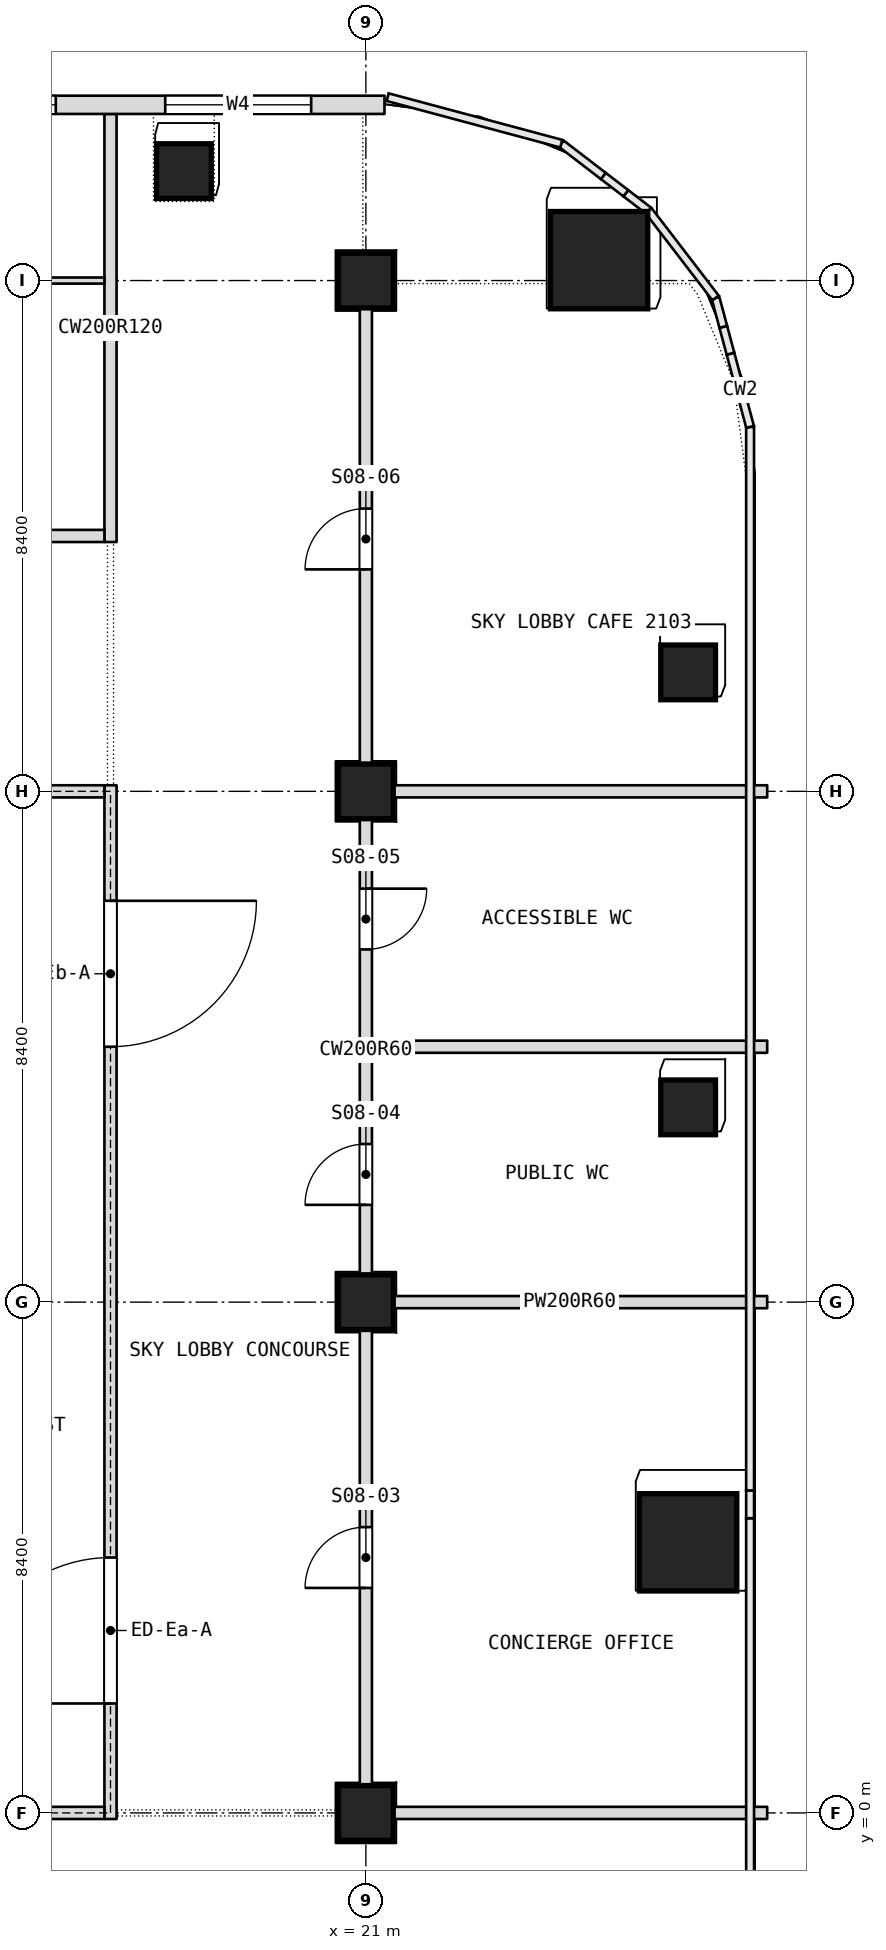
"""IFC4 building model, lengths in metres.
Left out: names, types, materials, properties, quantities, classifications, styles, units other than length and angle.
Written with IfcOpenShell. Run it as: python <this file> out.ifc"""

import sys

from ifc_helpers import new_model, si_unit, direction, frame, frame_2d, origin, origin_2d, place, context, subcontext, project, spatial, rectangle, extrude, element, fill, save


model = new_model("IFC4")
c1 = context("Model", 3, precision=1e-05, world=origin(), true_north=direction((0.0, 1.0)))
c2 = subcontext(c1, "Body", "Model", "MODEL_VIEW")
j1 = project(units=[si_unit("LENGTHUNIT", "METRE"), si_unit("PLANEANGLEUNIT", "RADIAN")], contexts=[c1])
p1 = place(None, origin())
s1 = spatial("IfcSite", under=j1, at=p1, CompositionType="ELEMENT")
p2 = place(p1, origin())
s2 = spatial("IfcBuilding", under=s1, at=p2, CompositionType="ELEMENT")
p3 = place(p2, frame((0.0, 0.0, 97.7)))
s3 = spatial("IfcBuildingStorey", under=s2, at=p3, CompositionType="ELEMENT", Elevation=97.7)
for number, where, z_axis, x_axis in (
    (1, (26.3, 4.45, 0.0), (0.0, 0.0, 1.0), (1.0, 0.0, 0.0)),
    (2, (24.835, 25.535, 0.0), (0.0, 0.0, 1.0), (1.0, 0.0, 0.0)),
):
    element("IfcColumn", number, at=place(p3, frame(where, z_axis=z_axis, x_axis=x_axis)), inside=s3, PredefinedType="COLUMN", context=c2, shape_type="SweptSolid", body=[
        extrude(rectangle(XDim=1.6, YDim=1.6, at=origin_2d()), origin(), (0.0, 0.0, 1.0), 7.2),
    ])
for number, where, z_axis, x_axis in (
    (3, (21.0, 0.0, 0.0), (0.0, 0.0, 1.0), (1.0, 0.0, 0.0)),
    (4, (21.0, 8.4, 0.0), (0.0, 0.0, 1.0), (1.0, 0.0, 0.0)),
    (5, (21.0, 16.8, 0.0), (0.0, 0.0, 1.0), (1.0, 0.0, 0.0)),
    (6, (21.0, 25.2, 0.0), (0.0, 0.0, 1.0), (1.0, 0.0, 0.0)),
    (7, (18.007, 27.0, 0.0), (0.0, 0.0, 1.0), (1.0, 0.0, 0.0)),
    (8, (26.3, 18.756, 0.0), (0.0, 0.0, 1.0), (1.0, 0.0, 0.0)),
    (9, (26.3, 11.603, 0.0), (0.0, 0.0, 1.0), (1.0, 0.0, 0.0)),
):
    element("IfcColumn", number, at=place(p3, frame(where, z_axis=z_axis, x_axis=x_axis)), inside=s3, PredefinedType="COLUMN", context=c2, shape_type="SweptSolid", body=[
        extrude(rectangle(XDim=0.9, YDim=0.9, at=origin_2d()), origin(), (0.0, 0.0, 1.0), 7.2),
    ])
p4 = place(p3, frame((21.0, -0.1, 0.0), z_axis=(0.0, 0.0, 1.0), x_axis=(0.0, 1.0, 0.0)))
e10 = element("IfcWall", 10, at=p4, inside=s3, PredefinedType="PARTITIONING", context=c2, shape_type="SweptSolid", body=[
    extrude(rectangle(XDim=25.3, YDim=0.2, at=frame_2d((12.65, 0.0))), origin(), (0.0, 0.0, 1.0), 6.94),
])
p5 = place(p4, frame((3.8, 0.0, 0.0)))
e11 = element("IfcOpeningElement", 11, at=p5, cuts=e10, PredefinedType="OPENING", context=c2, shape_type="SweptSolid", body=[
    extrude(rectangle(XDim=1.0, YDim=2.1, at=frame_2d((0.5, 1.05))), frame((0.0, 0.1, 0.0), z_axis=(0.0, -1.0, 0.0), x_axis=(1.0, 0.0, 0.0)), (0.0, 0.0, 1.0), 0.2),
])
p6 = place(p4, frame((10.1, 0.0, 0.0)))
e12 = element("IfcOpeningElement", 12, at=p6, cuts=e10, PredefinedType="OPENING", context=c2, shape_type="SweptSolid", body=[
    extrude(rectangle(XDim=1.0, YDim=2.1, at=frame_2d((0.5, 1.05))), frame((0.0, 0.1, 0.0), z_axis=(0.0, -1.0, 0.0), x_axis=(1.0, 0.0, 0.0)), (0.0, 0.0, 1.0), 0.2),
])
p7 = place(p4, frame((14.3, 0.0, 0.0)))
e13 = element("IfcOpeningElement", 13, at=p7, cuts=e10, PredefinedType="OPENING", context=c2, shape_type="SweptSolid", body=[
    extrude(rectangle(XDim=1.0, YDim=2.1, at=frame_2d((0.5, 1.05))), frame((0.0, 0.1, 0.0), z_axis=(0.0, -1.0, 0.0), x_axis=(1.0, 0.0, 0.0)), (0.0, 0.0, 1.0), 0.2),
])
p8 = place(p4, frame((20.55, 0.0, 0.0)))
e14 = element("IfcOpeningElement", 14, at=p8, cuts=e10, PredefinedType="OPENING", context=c2, shape_type="SweptSolid", body=[
    extrude(rectangle(XDim=1.0, YDim=2.1, at=frame_2d((0.5, 1.05))), frame((0.0, 0.1, 0.0), z_axis=(0.0, -1.0, 0.0), x_axis=(1.0, 0.0, 0.0)), (0.0, 0.0, 1.0), 0.2),
])
p9 = place(p3, frame((16.8, 20.9, 0.0), z_axis=(0.0, 0.0, 1.0), x_axis=(0.0, 1.0, 0.0)))
e15 = element("IfcWall", 15, at=p9, inside=s3, PredefinedType="PARTITIONING", context=c2, shape_type="SweptSolid", body=[
    extrude(rectangle(XDim=7.04, YDim=0.2, at=frame_2d((3.52, 0.0))), origin(), (0.0, 0.0, 1.0), 6.94),
])
for number, where, z_axis, x_axis in (
    (16, (21.1, 0.0, 0.0), (0.0, 0.0, 1.0), (1.0, 0.0, 0.0)),
    (17, (21.1, 8.4, 0.0), (0.0, 0.0, 1.0), (1.0, 0.0, 0.0)),
):
    element("IfcWall", number, at=place(p3, frame(where, z_axis=z_axis, x_axis=x_axis)), inside=s3, PredefinedType="PARTITIONING", context=c2, shape_type="SweptSolid", body=[
        extrude(rectangle(XDim=6.5, YDim=0.2, at=frame_2d((3.25, 0.0))), origin(), (0.0, 0.0, 1.0), 6.49),
    ])
p10 = place(p3, frame((21.1, 12.6, 0.0), z_axis=(0.0, 0.0, 1.0), x_axis=(1.0, 0.0, 0.0)))
e18 = element("IfcWall", 18, at=p10, inside=s3, PredefinedType="PARTITIONING", context=c2, shape_type="SweptSolid", body=[
    extrude(rectangle(XDim=6.5, YDim=0.2, at=frame_2d((3.25, 0.0))), origin(), (0.0, 0.0, 1.0), 6.94),
])
p11 = place(p3, frame((21.1, 16.8, 0.0), z_axis=(0.0, 0.0, 1.0), x_axis=(1.0, 0.0, 0.0)))
e19 = element("IfcWall", 19, at=p11, inside=s3, PredefinedType="PARTITIONING", context=c2, shape_type="SweptSolid", body=[
    extrude(rectangle(XDim=6.5, YDim=0.2, at=frame_2d((3.25, 0.0))), origin(), (0.0, 0.0, 1.0), 6.49),
])
p12 = place(p3, frame((9.1, 21.0, 0.0), z_axis=(0.0, 0.0, 1.0), x_axis=(1.0, 0.0, 0.0)))
e20 = element("IfcWall", 20, at=p12, inside=s3, PredefinedType="PARTITIONING", context=c2, shape_type="SweptSolid", body=[
    extrude(rectangle(XDim=7.6, YDim=0.2, at=frame_2d((3.8, 0.0))), origin(), (0.0, 0.0, 1.0), 6.94),
])
p13 = place(p12, frame((3.3, 0.0, 0.0)))
e21 = element("IfcOpeningElement", 21, at=p13, cuts=e20, PredefinedType="OPENING", context=c2, shape_type="SweptSolid", body=[
    extrude(rectangle(XDim=1.0, YDim=2.1, at=frame_2d((0.5, 1.05))), frame((0.0, 0.1, 0.0), z_axis=(0.0, -1.0, 0.0), x_axis=(1.0, 0.0, 0.0)), (0.0, 0.0, 1.0), 0.2),
])
p14 = place(p3, frame((-4.1, 25.2, 0.0), z_axis=(0.0, 0.0, 1.0), x_axis=(1.0, 0.0, 0.0)))
e22 = element("IfcWall", 22, at=p14, inside=s3, PredefinedType="PARTITIONING", context=c2, shape_type="SweptSolid", body=[
    extrude(rectangle(XDim=20.8, YDim=0.1, at=frame_2d((10.4, 0.0))), origin(), (0.0, 0.0, 1.0), 6.49),
])
p15 = place(p14, frame((9.9, 0.0, 0.0)))
e23 = element("IfcOpeningElement", 23, at=p15, cuts=e22, PredefinedType="OPENING", context=c2, shape_type="SweptSolid", body=[
    extrude(rectangle(XDim=1.0, YDim=2.1, at=frame_2d((0.5, 1.05))), frame((0.0, 0.05, 0.0), z_axis=(0.0, -1.0, 0.0), x_axis=(1.0, 0.0, 0.0)), (0.0, 0.0, 1.0), 0.1),
])
p16 = place(p3, frame((21.306, 28.09, 0.0), z_axis=(0.0, 0.0, 1.0), x_axis=(-1.0, 0.0, 0.0)))
e24 = element("IfcWall", 24, at=p16, inside=s3, PredefinedType="NOTDEFINED", context=c2, shape_type="SweptSolid", body=[
    extrude(rectangle(XDim=42.612, YDim=0.3, at=frame_2d((21.306, 0.0))), origin(), (0.0, 0.0, 1.0), 7.2),
])
p17 = place(p16, frame((1.206, 0.0, 0.9)))
e25 = element("IfcOpeningElement", 25, at=p17, cuts=e24, PredefinedType="OPENING", context=c2, shape_type="SweptSolid", body=[
    extrude(rectangle(XDim=2.4, YDim=4.5, at=frame_2d((1.2, 2.25))), frame((0.0, 0.15, 0.0), z_axis=(0.0, -1.0, 0.0), x_axis=(1.0, 0.0, 0.0)), (0.0, 0.0, 1.0), 0.3),
])
p18 = place(p16, frame((5.406, 0.0, 0.9)))
e26 = element("IfcOpeningElement", 26, at=p18, cuts=e24, PredefinedType="OPENING", context=c2, shape_type="SweptSolid", body=[
    extrude(rectangle(XDim=2.4, YDim=4.5, at=frame_2d((1.2, 2.25))), frame((0.0, 0.15, 0.0), z_axis=(0.0, -1.0, 0.0), x_axis=(1.0, 0.0, 0.0)), (0.0, 0.0, 1.0), 0.3),
])
p19 = place(p16, frame((9.606, 0.0, 0.9)))
e27 = element("IfcOpeningElement", 27, at=p19, cuts=e24, PredefinedType="OPENING", context=c2, shape_type="SweptSolid", body=[
    extrude(rectangle(XDim=2.4, YDim=4.5, at=frame_2d((1.2, 2.25))), frame((0.0, 0.15, 0.0), z_axis=(0.0, -1.0, 0.0), x_axis=(1.0, 0.0, 0.0)), (0.0, 0.0, 1.0), 0.3),
])
p20 = place(p16, frame((13.806, 0.0, 0.9)))
e28 = element("IfcOpeningElement", 28, at=p20, cuts=e24, PredefinedType="OPENING", context=c2, shape_type="SweptSolid", body=[
    extrude(rectangle(XDim=2.4, YDim=4.5, at=frame_2d((1.2, 2.25))), frame((0.0, 0.15, 0.0), z_axis=(0.0, -1.0, 0.0), x_axis=(1.0, 0.0, 0.0)), (0.0, 0.0, 1.0), 0.3),
])
p21 = place(p16, frame((18.006, 0.0, 0.9)))
e29 = element("IfcOpeningElement", 29, at=p21, cuts=e24, PredefinedType="OPENING", context=c2, shape_type="SweptSolid", body=[
    extrude(rectangle(XDim=2.4, YDim=4.5, at=frame_2d((1.2, 2.25))), frame((0.0, 0.15, 0.0), z_axis=(0.0, -1.0, 0.0), x_axis=(1.0, 0.0, 0.0)), (0.0, 0.0, 1.0), 0.3),
])
p22 = place(p16, frame((22.206, 0.0, 0.9)))
e30 = element("IfcOpeningElement", 30, at=p22, cuts=e24, PredefinedType="OPENING", context=c2, shape_type="SweptSolid", body=[
    extrude(rectangle(XDim=2.4, YDim=4.5, at=frame_2d((1.2, 2.25))), frame((0.0, 0.15, 0.0), z_axis=(0.0, -1.0, 0.0), x_axis=(1.0, 0.0, 0.0)), (0.0, 0.0, 1.0), 0.3),
])
p23 = place(p16, frame((26.406, 0.0, 0.9)))
e31 = element("IfcOpeningElement", 31, at=p23, cuts=e24, PredefinedType="OPENING", context=c2, shape_type="SweptSolid", body=[
    extrude(rectangle(XDim=2.4, YDim=4.5, at=frame_2d((1.2, 2.25))), frame((0.0, 0.15, 0.0), z_axis=(0.0, -1.0, 0.0), x_axis=(1.0, 0.0, 0.0)), (0.0, 0.0, 1.0), 0.3),
])
p24 = place(p16, frame((30.606, 0.0, 0.9)))
e32 = element("IfcOpeningElement", 32, at=p24, cuts=e24, PredefinedType="OPENING", context=c2, shape_type="SweptSolid", body=[
    extrude(rectangle(XDim=2.4, YDim=4.5, at=frame_2d((1.2, 2.25))), frame((0.0, 0.15, 0.0), z_axis=(0.0, -1.0, 0.0), x_axis=(1.0, 0.0, 0.0)), (0.0, 0.0, 1.0), 0.3),
])
p25 = place(p16, frame((34.806, 0.0, 0.9)))
e33 = element("IfcOpeningElement", 33, at=p25, cuts=e24, PredefinedType="OPENING", context=c2, shape_type="SweptSolid", body=[
    extrude(rectangle(XDim=2.4, YDim=4.5, at=frame_2d((1.2, 2.25))), frame((0.0, 0.15, 0.0), z_axis=(0.0, -1.0, 0.0), x_axis=(1.0, 0.0, 0.0)), (0.0, 0.0, 1.0), 0.3),
])
p26 = place(p16, frame((39.006, 0.0, 0.9)))
e34 = element("IfcOpeningElement", 34, at=p26, cuts=e24, PredefinedType="OPENING", context=c2, shape_type="SweptSolid", body=[
    extrude(rectangle(XDim=2.4, YDim=4.5, at=frame_2d((1.2, 2.25))), frame((0.0, 0.15, 0.0), z_axis=(0.0, -1.0, 0.0), x_axis=(1.0, 0.0, 0.0)), (0.0, 0.0, 1.0), 0.3),
])
p27 = place(p3, frame((16.8, -0.1, 0.0), z_axis=(0.0, 0.0, 1.0), x_axis=(0.0, 1.0, 0.0)))
e35 = element("IfcWall", 35, at=p27, inside=s3, PredefinedType="PARTITIONING", context=c2, shape_type="SweptSolid", body=[
    extrude(rectangle(XDim=17.0, YDim=0.2, at=frame_2d((8.5, 0.0))), origin(), (0.0, 0.0, 1.0), 6.94),
])
p28 = place(p27, frame((1.9, 0.0, 0.0)))
e36 = element("IfcOpeningElement", 36, at=p28, cuts=e35, PredefinedType="OPENING", context=c2, shape_type="SweptSolid", body=[
    extrude(rectangle(XDim=2.4, YDim=2.1, at=frame_2d((1.2, 1.05))), frame((0.0, 0.1, 0.0), z_axis=(0.0, -1.0, 0.0), x_axis=(1.0, 0.0, 0.0)), (0.0, 0.0, 1.0), 0.2),
])
p29 = place(p27, frame((12.7, 0.0, 0.0)))
e37 = element("IfcOpeningElement", 37, at=p29, cuts=e35, PredefinedType="OPENING", context=c2, shape_type="SweptSolid", body=[
    extrude(rectangle(XDim=2.4, YDim=2.1, at=frame_2d((1.2, 1.05))), frame((0.0, 0.1, 0.0), z_axis=(0.0, -1.0, 0.0), x_axis=(1.0, 0.0, 0.0)), (0.0, 0.0, 1.0), 0.2),
])
p30 = place(p3, frame((12.1, 0.0, 0.0), z_axis=(0.0, 0.0, 1.0), x_axis=(1.0, 0.0, 0.0)))
e38 = element("IfcWall", 38, at=p30, inside=s3, PredefinedType="PARTITIONING", context=c2, shape_type="SweptSolid", body=[
    extrude(rectangle(XDim=4.6, YDim=0.2, at=frame_2d((2.3, 0.0))), origin(), (0.0, 0.0, 1.0), 6.49),
])
p31 = place(p30, frame((1.3, 0.0, 0.0)))
e39 = element("IfcOpeningElement", 39, at=p31, cuts=e38, PredefinedType="OPENING", context=c2, shape_type="SweptSolid", body=[
    extrude(rectangle(XDim=1.2, YDim=2.1, at=frame_2d((0.6, 1.05))), frame((0.0, 0.1, 0.0), z_axis=(0.0, -1.0, 0.0), x_axis=(1.0, 0.0, 0.0)), (0.0, 0.0, 1.0), 0.2),
])
p32 = place(p3, frame((12.1, 16.8, 0.0), z_axis=(0.0, 0.0, 1.0), x_axis=(1.0, 0.0, 0.0)))
e40 = element("IfcWall", 40, at=p32, inside=s3, PredefinedType="PARTITIONING", context=c2, shape_type="SweptSolid", body=[
    extrude(rectangle(XDim=4.6, YDim=0.2, at=frame_2d((2.3, 0.0))), origin(), (0.0, 0.0, 1.0), 6.49),
])
p33 = place(p32, frame((1.3, 0.0, 0.0)))
e41 = element("IfcOpeningElement", 41, at=p33, cuts=e40, PredefinedType="OPENING", context=c2, shape_type="SweptSolid", body=[
    extrude(rectangle(XDim=1.2, YDim=2.1, at=frame_2d((0.6, 1.05))), frame((0.0, 0.1, 0.0), z_axis=(0.0, -1.0, 0.0), x_axis=(1.0, 0.0, 0.0)), (0.0, 0.0, 1.0), 0.2),
])
p34 = place(p5, origin())
e42 = element("IfcDoor", 42, at=p34, inside=s3, OperationType="SINGLE_SWING_RIGHT", PredefinedType="DOOR", context=c2, shape_type="SweptSolid", body=[
    extrude(rectangle(XDim=1.0, YDim=2.1, at=frame_2d((0.5, 1.05))), frame((0.0, 0.025, 0.0), z_axis=(0.0, -1.0, 0.0), x_axis=(1.0, 0.0, 0.0)), (0.0, 0.0, 1.0), 0.05),
])
fill(e11, e42)
p35 = place(p6, origin())
e43 = element("IfcDoor", 43, at=p35, inside=s3, OperationType="SINGLE_SWING_RIGHT", PredefinedType="DOOR", context=c2, shape_type="SweptSolid", body=[
    extrude(rectangle(XDim=1.0, YDim=2.1, at=frame_2d((0.5, 1.05))), frame((0.0, 0.025, 0.0), z_axis=(0.0, -1.0, 0.0), x_axis=(1.0, 0.0, 0.0)), (0.0, 0.0, 1.0), 0.05),
])
fill(e12, e43)
p36 = place(p7, origin())
e44 = element("IfcDoor", 44, at=p36, inside=s3, OperationType="SINGLE_SWING_LEFT", PredefinedType="DOOR", context=c2, shape_type="SweptSolid", body=[
    extrude(rectangle(XDim=1.0, YDim=2.1, at=frame_2d((0.5, 1.05))), frame((0.0, 0.025, 0.0), z_axis=(0.0, -1.0, 0.0), x_axis=(1.0, 0.0, 0.0)), (0.0, 0.0, 1.0), 0.05),
])
fill(e13, e44)
p37 = place(p8, origin())
e45 = element("IfcDoor", 45, at=p37, inside=s3, OperationType="SINGLE_SWING_LEFT", PredefinedType="DOOR", context=c2, shape_type="SweptSolid", body=[
    extrude(rectangle(XDim=1.0, YDim=2.1, at=frame_2d((0.5, 1.05))), frame((0.0, 0.025, 0.0), z_axis=(0.0, -1.0, 0.0), x_axis=(1.0, 0.0, 0.0)), (0.0, 0.0, 1.0), 0.05),
])
fill(e14, e45)
p38 = place(p17, origin())
e46 = element("IfcWindow", 46, at=p38, inside=s3, PartitioningType="SINGLE_PANEL", PredefinedType="WINDOW", context=c2, shape_type="SweptSolid", body=[
    extrude(rectangle(XDim=2.4, YDim=4.5, at=frame_2d((1.2, 2.25))), frame((0.0, 0.03, 0.0), z_axis=(0.0, -1.0, 0.0), x_axis=(1.0, 0.0, 0.0)), (0.0, 0.0, 1.0), 0.06),
])
fill(e25, e46)
p39 = place(p18, origin())
e47 = element("IfcWindow", 47, at=p39, inside=s3, PartitioningType="SINGLE_PANEL", PredefinedType="WINDOW", context=c2, shape_type="SweptSolid", body=[
    extrude(rectangle(XDim=2.4, YDim=4.5, at=frame_2d((1.2, 2.25))), frame((0.0, 0.03, 0.0), z_axis=(0.0, -1.0, 0.0), x_axis=(1.0, 0.0, 0.0)), (0.0, 0.0, 1.0), 0.06),
])
fill(e26, e47)
p40 = place(p28, origin())
e48 = element("IfcDoor", 48, at=p40, inside=s3, OperationType="DOUBLE_DOOR_SINGLE_SWING", PredefinedType="DOOR", context=c2, shape_type="SweptSolid", body=[
    extrude(rectangle(XDim=2.4, YDim=2.1, at=frame_2d((1.2, 1.05))), frame((0.0, 0.025, 0.0), z_axis=(0.0, -1.0, 0.0), x_axis=(1.0, 0.0, 0.0)), (0.0, 0.0, 1.0), 0.05),
])
fill(e36, e48)
p41 = place(p29, origin())
e49 = element("IfcDoor", 49, at=p41, inside=s3, OperationType="DOUBLE_DOOR_SINGLE_SWING", PredefinedType="DOOR", context=c2, shape_type="SweptSolid", body=[
    extrude(rectangle(XDim=2.4, YDim=2.1, at=frame_2d((1.2, 1.05))), frame((0.0, 0.025, 0.0), z_axis=(0.0, -1.0, 0.0), x_axis=(1.0, 0.0, 0.0)), (0.0, 0.0, 1.0), 0.05),
])
fill(e37, e49)
save(model, sys.argv[1])
